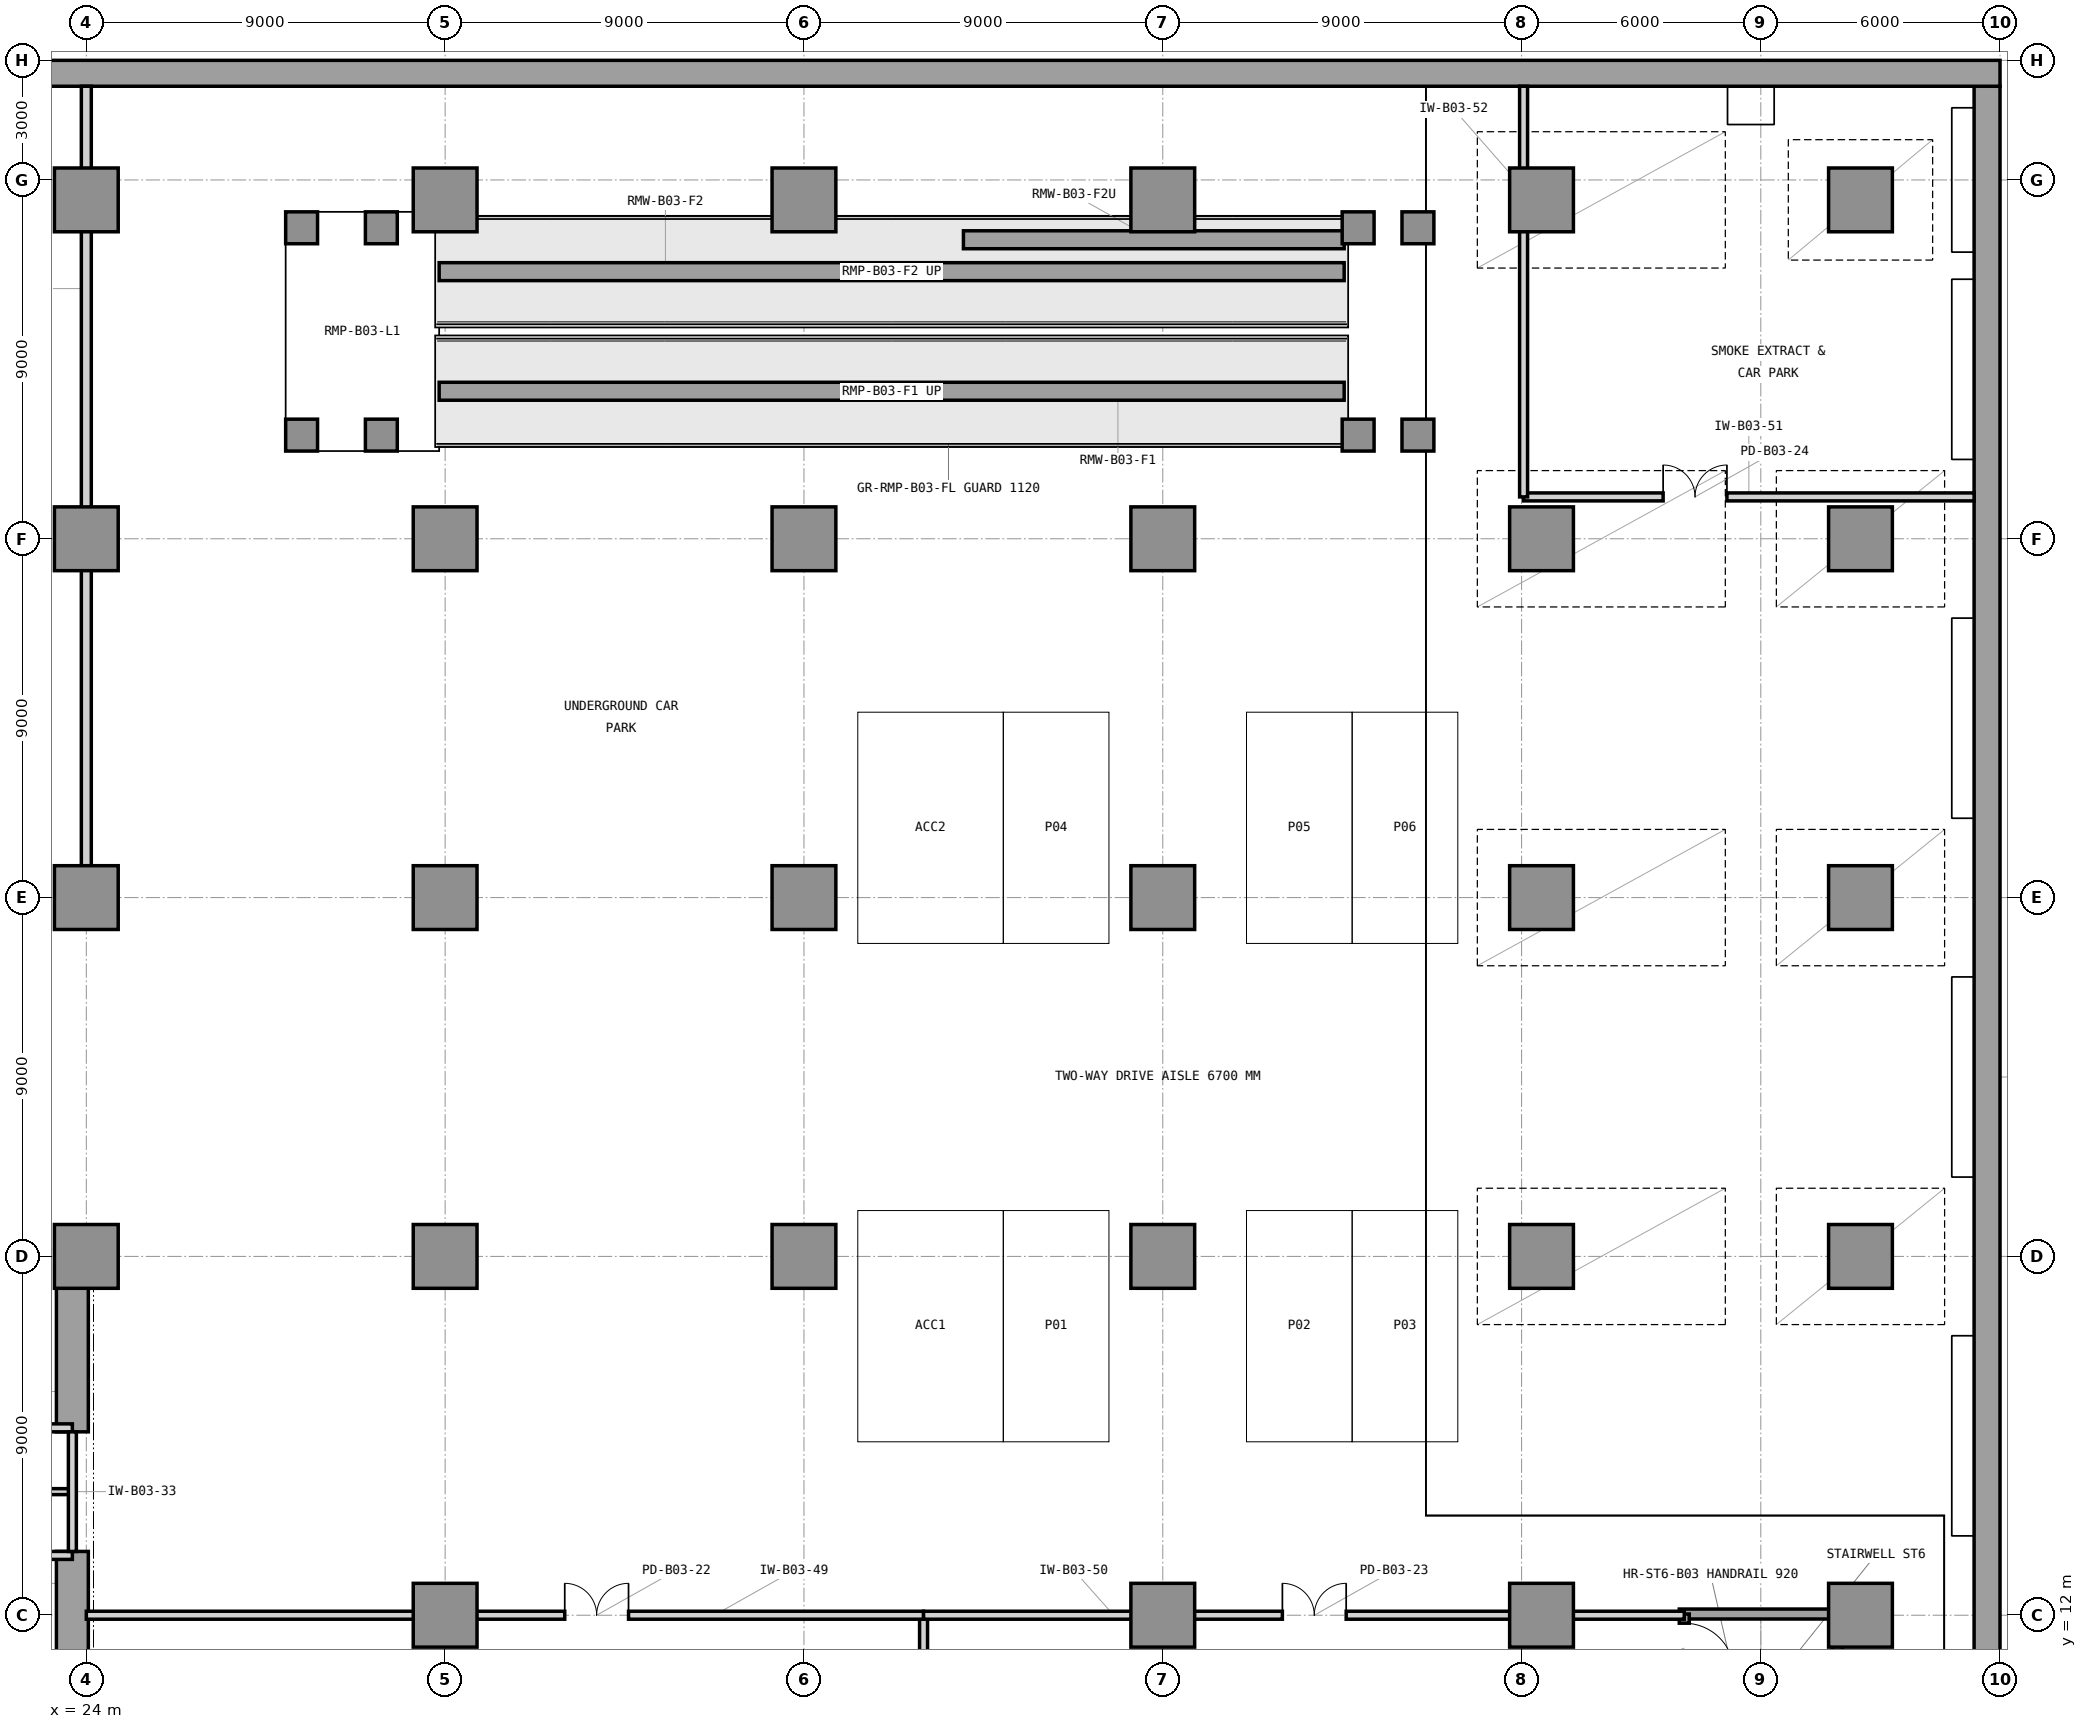
"""IFC4 building model, lengths in metres.
Left out: names, types, materials, properties, quantities, classifications, styles, units other than length and angle.
Written with IfcOpenShell. Run it as: python <this file> out.ifc"""

import sys

from ifc_helpers import new_model, si_unit, direction, frame, frame_2d, origin, origin_2d, place, context, subcontext, project, spatial, rectangle, extrude, element, fill, save


model = new_model("IFC4")
c1 = context("Model", 3, precision=1e-05, world=origin(), true_north=direction((0.0, 1.0)))
c2 = subcontext(c1, "Body", "Model", "MODEL_VIEW")
j1 = project(units=[si_unit("LENGTHUNIT", "METRE"), si_unit("PLANEANGLEUNIT", "RADIAN")], contexts=[c1])
p1 = place(None, origin())
s1 = spatial("IfcSite", under=j1, at=p1, CompositionType="ELEMENT")
p2 = place(p1, origin())
s2 = spatial("IfcBuilding", under=s1, at=p2, CompositionType="ELEMENT")
p3 = place(p2, frame((0.0, 0.0, -13.5)))
s3 = spatial("IfcBuildingStorey", under=s2, at=p3, CompositionType="ELEMENT", Elevation=-13.5)
p4 = place(p3, frame((71.675, 0.65, 0.0), z_axis=(0.0, 0.0, 1.0), x_axis=(0.0, 1.0, 0.0)))
e1 = element("IfcWall", 1, at=p4, inside=s3, PredefinedType="USERDEFINED", context=c2, shape_type="SweptSolid", body=[
    extrude(rectangle(XDim=49.7, YDim=0.65, at=frame_2d((24.85, 0.0))), origin(), (0.0, 0.0, 1.0), 4.5),
])
p5 = place(p3, frame((72.0, 50.675, 0.0), z_axis=(0.0, 0.0, 1.0), x_axis=(-1.0, 0.0, 0.0)))
e2 = element("IfcWall", 2, at=p5, inside=s3, PredefinedType="USERDEFINED", context=c2, shape_type="SweptSolid", body=[
    extrude(rectangle(XDim=72.0, YDim=0.65, at=frame_2d((36.0, 0.0))), origin(), (0.0, 0.0, 1.0), 4.5),
])
p6 = place(p3, frame((23.65, 10.4, 0.0), z_axis=(0.0, 0.0, 1.0), x_axis=(0.0, 1.0, 0.0)))
e3 = element("IfcWall", 3, at=p6, inside=s3, PredefinedType="SHEAR", context=c2, shape_type="SweptSolid", body=[
    extrude(rectangle(XDim=3.2, YDim=0.8, at=frame_2d((1.6, 0.0))), origin(), (0.0, 0.0, 1.0), 4.5),
])
p7 = place(p3, frame((23.65, 16.6, 0.0), z_axis=(0.0, 0.0, 1.0), x_axis=(0.0, 1.0, 0.0)))
e4 = element("IfcWall", 4, at=p7, inside=s3, PredefinedType="SHEAR", context=c2, shape_type="SweptSolid", body=[
    extrude(rectangle(XDim=4.05, YDim=0.8, at=frame_2d((2.025, 0.0))), origin(), (0.0, 0.0, 1.0), 4.5),
])
for number, where, z_axis, x_axis in (
    (5, (24.0, 21.0, 0.0), (0.0, 0.0, 1.0), (1.0, 0.0, 0.0)),
    (6, (24.0, 30.0, 0.0), (0.0, 0.0, 1.0), (1.0, 0.0, 0.0)),
    (7, (24.0, 39.0, 0.0), (0.0, 0.0, 1.0), (1.0, 0.0, 0.0)),
    (8, (24.0, 47.5, 0.0), (0.0, 0.0, 1.0), (1.0, 0.0, 0.0)),
    (9, (33.0, 12.0, 0.0), (0.0, 0.0, 1.0), (1.0, 0.0, 0.0)),
    (10, (33.0, 21.0, 0.0), (0.0, 0.0, 1.0), (1.0, 0.0, 0.0)),
    (11, (33.0, 30.0, 0.0), (0.0, 0.0, 1.0), (1.0, 0.0, 0.0)),
    (12, (33.0, 39.0, 0.0), (0.0, 0.0, 1.0), (1.0, 0.0, 0.0)),
    (13, (33.0, 47.5, 0.0), (0.0, 0.0, 1.0), (1.0, 0.0, 0.0)),
    (14, (42.0, 21.0, 0.0), (0.0, 0.0, 1.0), (1.0, 0.0, 0.0)),
    (15, (42.0, 30.0, 0.0), (0.0, 0.0, 1.0), (1.0, 0.0, 0.0)),
    (16, (42.0, 39.0, 0.0), (0.0, 0.0, 1.0), (1.0, 0.0, 0.0)),
    (17, (42.0, 47.5, 0.0), (0.0, 0.0, 1.0), (1.0, 0.0, 0.0)),
    (18, (51.0, 12.0, 0.0), (0.0, 0.0, 1.0), (1.0, 0.0, 0.0)),
    (19, (51.0, 21.0, 0.0), (0.0, 0.0, 1.0), (1.0, 0.0, 0.0)),
    (20, (51.0, 30.0, 0.0), (0.0, 0.0, 1.0), (1.0, 0.0, 0.0)),
    (21, (51.0, 39.0, 0.0), (0.0, 0.0, 1.0), (1.0, 0.0, 0.0)),
    (22, (51.0, 47.5, 0.0), (0.0, 0.0, 1.0), (1.0, 0.0, 0.0)),
    (23, (60.5, 12.0, 0.0), (0.0, 0.0, 1.0), (1.0, 0.0, 0.0)),
    (24, (60.5, 21.0, 0.0), (0.0, 0.0, 1.0), (1.0, 0.0, 0.0)),
    (25, (60.5, 30.0, 0.0), (0.0, 0.0, 1.0), (1.0, 0.0, 0.0)),
    (26, (60.5, 39.0, 0.0), (0.0, 0.0, 1.0), (1.0, 0.0, 0.0)),
    (27, (60.5, 47.5, 0.0), (0.0, 0.0, 1.0), (1.0, 0.0, 0.0)),
    (28, (68.5, 12.0, 0.0), (0.0, 0.0, 1.0), (1.0, 0.0, 0.0)),
    (29, (68.5, 21.0, 0.0), (0.0, 0.0, 1.0), (1.0, 0.0, 0.0)),
    (30, (68.5, 30.0, 0.0), (0.0, 0.0, 1.0), (1.0, 0.0, 0.0)),
    (31, (68.5, 39.0, 0.0), (0.0, 0.0, 1.0), (1.0, 0.0, 0.0)),
    (32, (68.5, 47.5, 0.0), (0.0, 0.0, 1.0), (1.0, 0.0, 0.0)),
):
    element("IfcColumn", number, at=place(p3, frame(where, z_axis=z_axis, x_axis=x_axis)), inside=s3, PredefinedType="COLUMN", context=c2, shape_type="SweptSolid", body=[
        extrude(rectangle(XDim=1.6, YDim=1.6, at=origin_2d()), origin(), (0.0, 0.0, 1.0), 4.5),
    ])
p8 = place(p3, frame((16.45, 16.7, 0.0), z_axis=(0.0, 0.0, 1.0), x_axis=(1.0, 0.0, 0.0)))
e33 = element("IfcWall", 33, at=p8, inside=s3, PredefinedType="PARTITIONING", context=c2, shape_type="SweptSolid", body=[
    extrude(rectangle(XDim=7.2, YDim=0.2, at=frame_2d((3.6, 0.0))), origin(), (0.0, 0.0, 1.0), 3.523),
])
p9 = place(p8, frame((0.25, 0.0, 0.0)))
e34 = element("IfcOpeningElement", 34, at=p9, cuts=e33, PredefinedType="OPENING", context=c2, shape_type="SweptSolid", body=[
    extrude(rectangle(XDim=1.2, YDim=2.2, at=frame_2d((0.6, 1.1))), frame((0.0, 0.11, 0.0), z_axis=(0.0, -1.0, 0.0), x_axis=(1.0, 0.0, 0.0)), (0.0, 0.0, 1.0), 0.22),
])
p10 = place(p3, frame((14.7, 13.5, 0.0), z_axis=(0.0, 0.0, 1.0), x_axis=(1.0, 0.0, 0.0)))
e35 = element("IfcWall", 35, at=p10, inside=s3, PredefinedType="PARTITIONING", context=c2, shape_type="SweptSolid", body=[
    extrude(rectangle(XDim=8.95, YDim=0.2, at=frame_2d((4.475, 0.0))), origin(), (0.0, 0.0, 1.0), 3.523),
])
p11 = place(p3, frame((18.25, 15.1, 0.0), z_axis=(0.0, 0.0, 1.0), x_axis=(1.0, 0.0, 0.0)))
e36 = element("IfcWall", 36, at=p11, inside=s3, PredefinedType="PARTITIONING", context=c2, shape_type="SweptSolid", body=[
    extrude(rectangle(XDim=5.4, YDim=0.15, at=frame_2d((2.7, 0.0))), origin(), (0.0, 0.0, 1.0), 4.14),
])
p12 = place(p3, frame((23.65, 13.6, 0.0), z_axis=(0.0, 0.0, 1.0), x_axis=(0.0, 1.0, 0.0)))
e37 = element("IfcWall", 37, at=p12, inside=s3, PredefinedType="PARTITIONING", context=c2, shape_type="SweptSolid", body=[
    extrude(rectangle(XDim=3.0, YDim=0.2, at=frame_2d((1.5, 0.0))), origin(), (0.0, 0.0, 1.0), 4.14),
])
p13 = place(p3, frame((63.955, 12.03, 0.0), z_axis=(0.0, 0.0, 1.0), x_axis=(1.0, 0.0, 0.0)))
e38 = element("IfcWall", 38, at=p13, inside=s3, PredefinedType="SHEAR", context=c2, shape_type="SweptSolid", body=[
    extrude(rectangle(XDim=4.09, YDim=0.25, at=frame_2d((2.045, 0.0))), origin(), (0.0, 0.0, 1.0), 4.5),
])
p14 = place(p3, frame((67.92, 4.53, 0.0), z_axis=(0.0, 0.0, 1.0), x_axis=(0.0, 1.0, 0.0)))
e39 = element("IfcWall", 39, at=p14, inside=s3, PredefinedType="SHEAR", context=c2, shape_type="SweptSolid", body=[
    extrude(rectangle(XDim=7.5, YDim=0.25, at=frame_2d((3.75, 0.0))), origin(), (0.0, 0.0, 1.0), 4.5),
])
p15 = place(p3, frame((64.08, 4.53, 0.0), z_axis=(0.0, 0.0, 1.0), x_axis=(0.0, 1.0, 0.0)))
e40 = element("IfcWall", 40, at=p15, inside=s3, PredefinedType="SHEAR", context=c2, shape_type="SweptSolid", body=[
    extrude(rectangle(XDim=7.5, YDim=0.25, at=frame_2d((3.75, 0.0))), origin(), (0.0, 0.0, 1.0), 4.5),
])
p16 = place(p15, frame((6.02, 0.0, 0.0)))
e41 = element("IfcOpeningElement", 41, at=p16, cuts=e40, PredefinedType="OPENING", context=c2, shape_type="SweptSolid", body=[
    extrude(rectangle(XDim=1.25, YDim=2.2, at=frame_2d((0.625, 1.1))), frame((0.0, 0.135, 0.0), z_axis=(0.0, -1.0, 0.0), x_axis=(1.0, 0.0, 0.0)), (0.0, 0.0, 1.0), 0.27),
])
p17 = place(p3, frame((24.0, 30.05, 0.0), z_axis=(0.0, 0.0, 1.0), x_axis=(0.0, 1.0, 0.0)))
e42 = element("IfcWall", 42, at=p17, inside=s3, PredefinedType="PARTITIONING", context=c2, shape_type="SweptSolid", body=[
    extrude(rectangle(XDim=20.3, YDim=0.25, at=frame_2d((10.15, 0.0))), origin(), (0.0, 0.0, 1.0), 3.2),
])
p18 = place(p3, frame((45.0, 0.65, 0.0), z_axis=(0.0, 0.0, 1.0), x_axis=(0.0, 1.0, 0.0)))
e43 = element("IfcWall", 43, at=p18, inside=s3, PredefinedType="PARTITIONING", context=c2, shape_type="SweptSolid", body=[
    extrude(rectangle(XDim=11.35, YDim=0.2, at=frame_2d((5.675, 0.0))), origin(), (0.0, 0.0, 1.0), 4.14),
])
p19 = place(p3, frame((24.0, 12.0, 0.0), z_axis=(0.0, 0.0, 1.0), x_axis=(1.0, 0.0, 0.0)))
e44 = element("IfcWall", 44, at=p19, inside=s3, PredefinedType="PARTITIONING", context=c2, shape_type="SweptSolid", body=[
    extrude(rectangle(XDim=21.0, YDim=0.2, at=frame_2d((10.5, 0.0))), origin(), (0.0, 0.0, 1.0), 3.2),
])
p20 = place(p19, frame((12.0, 0.0, 0.0)))
e45 = element("IfcOpeningElement", 45, at=p20, cuts=e44, PredefinedType="OPENING", context=c2, shape_type="SweptSolid", body=[
    extrude(rectangle(XDim=1.6, YDim=2.3, at=frame_2d((0.8, 1.15))), frame((0.0, 0.11, 0.0), z_axis=(0.0, -1.0, 0.0), x_axis=(1.0, 0.0, 0.0)), (0.0, 0.0, 1.0), 0.22),
])
p21 = place(p3, frame((45.0, 12.0, 0.0), z_axis=(0.0, 0.0, 1.0), x_axis=(1.0, 0.0, 0.0)))
e46 = element("IfcWall", 46, at=p21, inside=s3, PredefinedType="PARTITIONING", context=c2, shape_type="SweptSolid", body=[
    extrude(rectangle(XDim=19.08, YDim=0.2, at=frame_2d((9.54, 0.0))), origin(), (0.0, 0.0, 1.0), 3.2),
])
p22 = place(p21, frame((9.0, 0.0, 0.0)))
e47 = element("IfcOpeningElement", 47, at=p22, cuts=e46, PredefinedType="OPENING", context=c2, shape_type="SweptSolid", body=[
    extrude(rectangle(XDim=1.6, YDim=2.3, at=frame_2d((0.8, 1.15))), frame((0.0, 0.11, 0.0), z_axis=(0.0, -1.0, 0.0), x_axis=(1.0, 0.0, 0.0)), (0.0, 0.0, 1.0), 0.22),
])
p23 = place(p3, frame((60.05, 40.05, 0.0), z_axis=(0.0, 0.0, 1.0), x_axis=(1.0, 0.0, 0.0)))
e48 = element("IfcWall", 48, at=p23, inside=s3, PredefinedType="PARTITIONING", context=c2, shape_type="SweptSolid", body=[
    extrude(rectangle(XDim=11.3, YDim=0.2, at=frame_2d((5.65, 0.0))), origin(), (0.0, 0.0, 1.0), 4.14),
])
p24 = place(p23, frame((3.5, 0.0, 0.0)))
e49 = element("IfcOpeningElement", 49, at=p24, cuts=e48, PredefinedType="OPENING", context=c2, shape_type="SweptSolid", body=[
    extrude(rectangle(XDim=1.6, YDim=2.3, at=frame_2d((0.8, 1.15))), frame((0.0, 0.11, 0.0), z_axis=(0.0, -1.0, 0.0), x_axis=(1.0, 0.0, 0.0)), (0.0, 0.0, 1.0), 0.22),
])
p25 = place(p3, frame((60.05, 40.05, 0.0), z_axis=(0.0, 0.0, 1.0), x_axis=(0.0, 1.0, 0.0)))
e50 = element("IfcWall", 50, at=p25, inside=s3, PredefinedType="PARTITIONING", context=c2, shape_type="SweptSolid", body=[
    extrude(rectangle(XDim=10.3, YDim=0.2, at=frame_2d((5.15, 0.0))), origin(), (0.0, 0.0, 1.0), 3.2),
])
for number, where, z_axis, x_axis in (
    (51, (29.4, 41.6, 0.0), (0.0, 0.0, 1.0), (1.0, 0.0, 0.0)),
    (52, (29.4, 46.8, 0.0), (0.0, 0.0, 1.0), (1.0, 0.0, 0.0)),
    (53, (31.4, 41.6, 0.0), (0.0, 0.0, 1.0), (1.0, 0.0, 0.0)),
    (54, (31.4, 46.8, 0.0), (0.0, 0.0, 1.0), (1.0, 0.0, 0.0)),
    (55, (55.9, 41.6, 0.0), (0.0, 0.0, 1.0), (1.0, 0.0, 0.0)),
    (56, (55.9, 46.8, 0.0), (0.0, 0.0, 1.0), (1.0, 0.0, 0.0)),
    (57, (57.4, 41.6, 0.0), (0.0, 0.0, 1.0), (1.0, 0.0, 0.0)),
    (58, (57.4, 46.8, 0.0), (0.0, 0.0, 1.0), (1.0, 0.0, 0.0)),
):
    element("IfcColumn", number, at=place(p3, frame(where, z_axis=z_axis, x_axis=x_axis)), inside=s3, PredefinedType="COLUMN", context=c2, shape_type="SweptSolid", body=[
        extrude(rectangle(XDim=0.8, YDim=0.8, at=origin_2d()), origin(), (0.0, 0.0, 1.0), 4.5),
    ])
p26 = place(p3, frame((32.85, 45.7, 0.0), z_axis=(0.0, 0.0, 1.0), x_axis=(1.0, 0.0, 0.0)))
e59 = element("IfcWall", 59, at=p26, inside=s3, PredefinedType="SHEAR", context=c2, shape_type="SweptSolid", body=[
    extrude(rectangle(XDim=22.7, YDim=0.45, at=frame_2d((11.35, 0.0))), origin(), (0.0, 0.0, 1.0), 2.01),
])
p27 = place(p3, frame((46.0, 46.5, 0.0), z_axis=(0.0, 0.0, 1.0), x_axis=(1.0, 0.0, 0.0)))
e60 = element("IfcWall", 60, at=p27, inside=s3, PredefinedType="SHEAR", context=c2, shape_type="SweptSolid", body=[
    extrude(rectangle(XDim=9.55, YDim=0.45, at=frame_2d((4.775, 0.0))), origin(), (0.0, 0.0, 1.0), 4.5),
])
p28 = place(p3, frame((32.85, 42.7, 0.0), z_axis=(0.0, 0.0, 1.0), x_axis=(1.0, 0.0, 0.0)))
e61 = element("IfcWall", 61, at=p28, inside=s3, PredefinedType="SHEAR", context=c2, shape_type="SweptSolid", body=[
    extrude(rectangle(XDim=22.7, YDim=0.45, at=frame_2d((11.35, 0.0))), origin(), (0.0, 0.0, 1.0), 4.26),
])
p29 = place(p16, frame((1.25, 0.0, 0.0), z_axis=(0.0, 0.0, 1.0), x_axis=(-1.0, 0.0, 0.0)))
e62 = element("IfcDoor", 62, at=p29, inside=s3, OperationType="SINGLE_SWING_RIGHT", PredefinedType="DOOR", context=c2, shape_type="SweptSolid", body=[
    extrude(rectangle(XDim=1.25, YDim=2.2, at=frame_2d((0.625, 1.1))), frame((0.0, 0.025, 0.0), z_axis=(0.0, -1.0, 0.0), x_axis=(1.0, 0.0, 0.0)), (0.0, 0.0, 1.0), 0.05),
])
fill(e41, e62)
p30 = place(p20, origin())
e63 = element("IfcDoor", 63, at=p30, inside=s3, OperationType="DOUBLE_DOOR_SINGLE_SWING", PredefinedType="DOOR", context=c2, shape_type="SweptSolid", body=[
    extrude(rectangle(XDim=1.6, YDim=2.3, at=frame_2d((0.8, 1.15))), frame((0.0, 0.025, 0.0), z_axis=(0.0, -1.0, 0.0), x_axis=(1.0, 0.0, 0.0)), (0.0, 0.0, 1.0), 0.05),
])
fill(e45, e63)
p31 = place(p22, origin())
e64 = element("IfcDoor", 64, at=p31, inside=s3, OperationType="DOUBLE_DOOR_SINGLE_SWING", PredefinedType="DOOR", context=c2, shape_type="SweptSolid", body=[
    extrude(rectangle(XDim=1.6, YDim=2.3, at=frame_2d((0.8, 1.15))), frame((0.0, 0.025, 0.0), z_axis=(0.0, -1.0, 0.0), x_axis=(1.0, 0.0, 0.0)), (0.0, 0.0, 1.0), 0.05),
])
fill(e47, e64)
p32 = place(p24, origin())
e65 = element("IfcDoor", 65, at=p32, inside=s3, OperationType="DOUBLE_DOOR_SINGLE_SWING", PredefinedType="DOOR", context=c2, shape_type="SweptSolid", body=[
    extrude(rectangle(XDim=1.6, YDim=2.3, at=frame_2d((0.8, 1.15))), frame((0.0, 0.025, 0.0), z_axis=(0.0, -1.0, 0.0), x_axis=(1.0, 0.0, 0.0)), (0.0, 0.0, 1.0), 0.05),
])
fill(e49, e65)
save(model, sys.argv[1])
